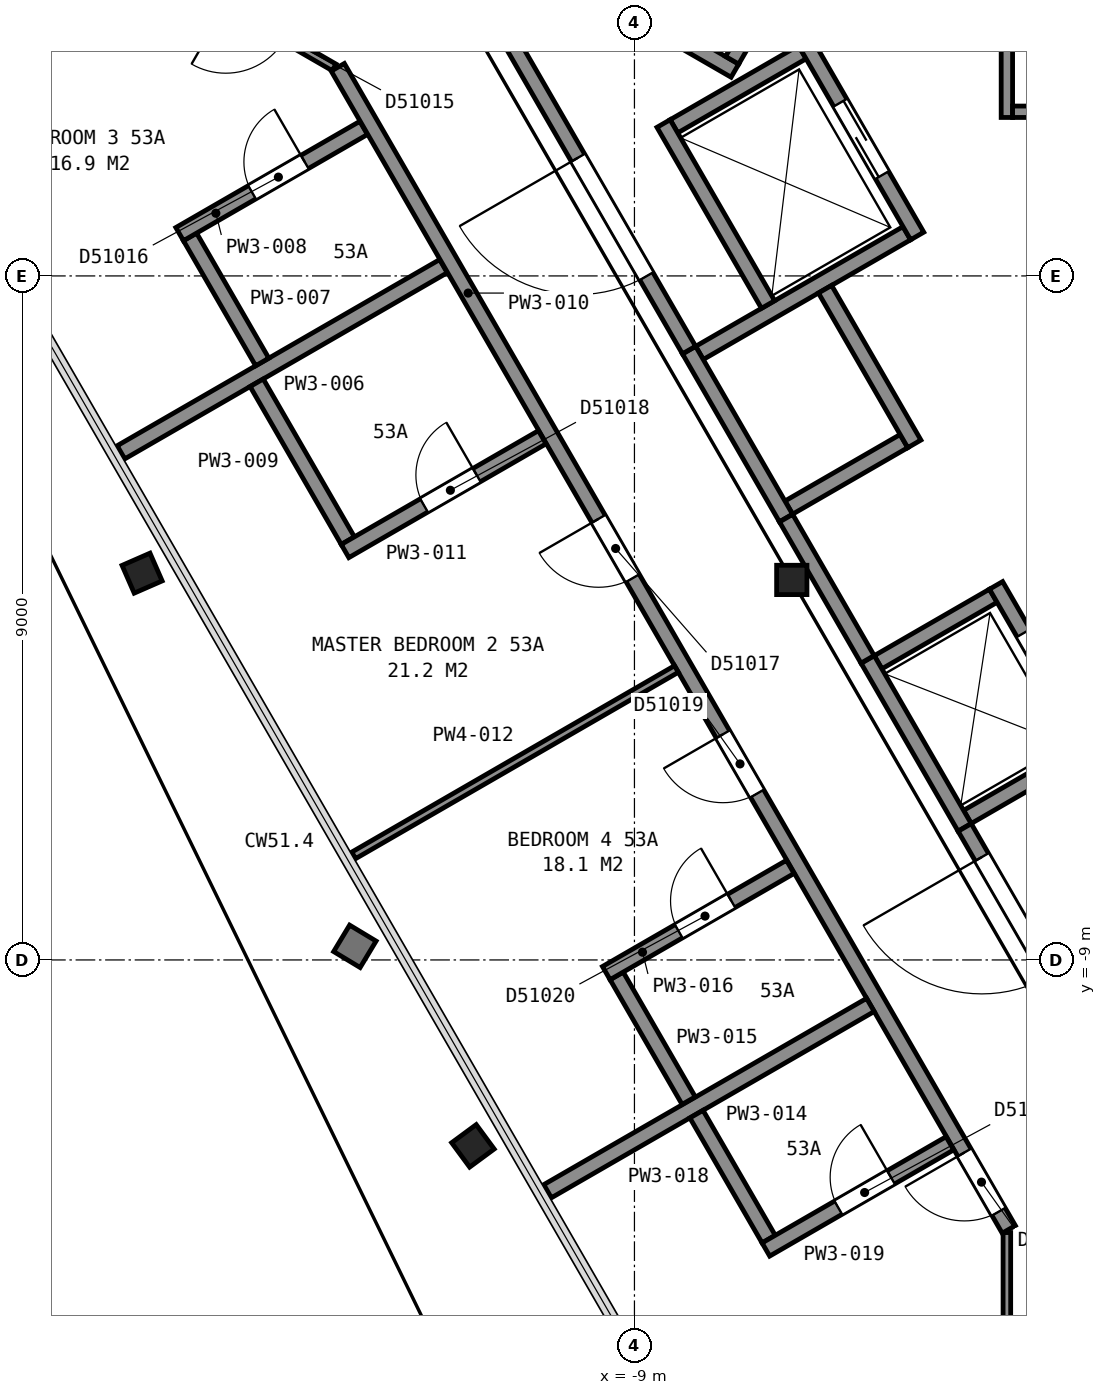
"""IFC4 building model, lengths in metres.
Left out: names, types, materials, properties, quantities, classifications, styles, units other than length and angle.
Written with IfcOpenShell. Run it as: python <this file> out.ifc"""

import sys

from ifc_helpers import new_model, si_unit, direction, frame, frame_2d, origin, origin_2d, place, context, subcontext, project, spatial, rectangle, i_section, extrude, element, fill, save


model = new_model("IFC4")
c1 = context("Model", 3, precision=1e-05, world=origin(), true_north=direction((0.0, 1.0)))
c2 = subcontext(c1, "Body", "Model", "MODEL_VIEW")
j1 = project(units=[si_unit("LENGTHUNIT", "METRE"), si_unit("PLANEANGLEUNIT", "RADIAN")], contexts=[c1])
p1 = place(None, origin())
s1 = spatial("IfcSite", under=j1, at=p1, CompositionType="ELEMENT")
p2 = place(p1, origin())
s2 = spatial("IfcBuilding", under=s1, at=p2, CompositionType="ELEMENT")
p3 = place(p2, frame((0.0, 0.0, 213.8)))
s3 = spatial("IfcBuildingStorey", under=s2, at=p3, CompositionType="ELEMENT", Elevation=213.8)
p4 = place(p3, frame((-15.276, -3.823, 0.035), z_axis=(-0.169909418079, -0.074413848602, 0.982646105566), x_axis=(-0.500226220169, 0.86564150205, -0.020940835345)))
e1 = element("IfcColumn", 1, at=p4, inside=s3, PredefinedType="COLUMN", context=c2, shape_type="SweptSolid", body=[
    extrude(i_section(OverallWidth=0.401, OverallDepth=0.399, WebThickness=0.025, FlangeThickness=0.04, FilletRadius=0.015, at=origin_2d()), origin(), (0.0, 0.0, 1.0), 3.694),
])
p5 = place(p3, frame((-10.945, -11.314, 0.035), z_axis=(-0.15133236457, -0.11150110493, 0.982174128672), x_axis=(-0.499861643135, 0.865843891747, 0.021276579787)))
e2 = element("IfcColumn", 2, at=p5, inside=s3, PredefinedType="COLUMN", context=c2, shape_type="SweptSolid", body=[
    extrude(i_section(OverallWidth=0.401, OverallDepth=0.399, WebThickness=0.025, FlangeThickness=0.04, FilletRadius=0.015, at=origin_2d()), origin(), (0.0, 0.0, 1.0), 3.696),
])
p6 = place(p3, frame((-6.93, -4.0, 0.0), z_axis=(0.0, 0.0, 1.0), x_axis=(1.0, 0.0, 0.0)))
e3 = element("IfcColumn", 3, at=p6, inside=s3, PredefinedType="COLUMN", context=c2, shape_type="SweptSolid", body=[
    extrude(i_section(OverallWidth=0.399, OverallDepth=0.386, WebThickness=0.021, FlangeThickness=0.033, FilletRadius=0.015, at=origin_2d()), origin(), (0.0, 0.0, 1.0), 3.7),
])
p7 = place(p3, frame((-7.678, 2.701, 0.0), z_axis=(0.0, 0.0, 1.0), x_axis=(-0.866019993635, 0.500009370536, 0.0)))
e4 = element("IfcWall", 4, at=p7, inside=s3, PredefinedType="PARTITIONING", context=c2, shape_type="SweptSolid", body=[
    extrude(rectangle(XDim=9.6, YDim=0.2, at=frame_2d((4.8, 0.0))), origin(), (0.0, 0.0, 1.0), 3.45),
])
p8 = place(p3, frame((-6.315, 5.262, 0.0), z_axis=(0.0, 0.0, 1.0), x_axis=(-0.500049511043, -0.865996816683, 0.0)))
e5 = element("IfcWall", 5, at=p8, inside=s3, PredefinedType="PARTITIONING", context=c2, shape_type="SweptSolid", body=[
    extrude(rectangle(XDim=2.8, YDim=0.2, at=frame_2d((1.4, 0.0))), origin(), (0.0, 0.0, 1.0), 3.45),
])
for number, where, z_axis, x_axis in (
    (6, (-4.62, -7.118, 0.0), (0.0, 0.0, 1.0), (0.866, 0.5, 0.0)),
    (7, (-5.795, -5.083, 0.0), (0.0, 0.0, 1.0), (0.866, 0.5, 0.0)),
    (8, (-6.97, -3.048, 0.0), (0.0, 0.0, 1.0), (0.866, 0.5, 0.0)),
):
    element("IfcWall", number, at=place(p3, frame(where, z_axis=z_axis, x_axis=x_axis)), inside=s3, PredefinedType="PARTITIONING", context=c2, shape_type="SweptSolid", body=[
        extrude(rectangle(XDim=1.75, YDim=0.2, at=frame_2d((0.875, 0.0))), origin(), (0.0, 0.0, 1.0), 3.7),
    ])
p9 = place(p3, frame((-8.145, -1.013, 0.0), z_axis=(0.0, 0.0, 1.0), x_axis=(0.866016494683, 0.500015430699, 0.0)))
e9 = element("IfcWall", 9, at=p9, inside=s3, PredefinedType="PARTITIONING", context=c2, shape_type="SweptSolid", body=[
    extrude(rectangle(XDim=3.15, YDim=0.2, at=frame_2d((1.575, 0.0))), origin(), (0.0, 0.0, 1.0), 3.7),
])
p10 = place(p3, frame((-8.48, 1.969, 0.0), z_axis=(0.0, 0.0, 1.0), x_axis=(0.866000020948, 0.500043961785, 0.0)))
e10 = element("IfcWall", 10, at=p10, inside=s3, PredefinedType="PARTITIONING", context=c2, shape_type="SweptSolid", body=[
    extrude(rectangle(XDim=1.95, YDim=0.2, at=frame_2d((0.975, 0.0))), origin(), (0.0, 0.0, 1.0), 3.7),
])
p11 = place(p3, frame((-5.28, 0.525, 0.0), z_axis=(0.0, 0.0, 1.0), x_axis=(-0.500037662692, 0.866003658127, 0.0)))
e11 = element("IfcWall", 11, at=p11, inside=s3, PredefinedType="PARTITIONING", context=c2, shape_type="SweptSolid", body=[
    extrude(rectangle(XDim=2.95, YDim=0.2, at=frame_2d((1.475, 0.0))), origin(), (0.0, 0.0, 1.0), 3.7),
])
p12 = place(p11, frame((0.925, 0.0, 0.0)))
e12 = element("IfcOpeningElement", 12, at=p12, cuts=e11, PredefinedType="OPENING", context=c2, shape_type="SweptSolid", body=[
    extrude(rectangle(XDim=1.1, YDim=2.1, at=frame_2d((0.55, 1.05))), frame((0.0, 0.11, 0.0), z_axis=(0.0, -1.0, 0.0), x_axis=(1.0, 0.0, 0.0)), (0.0, 0.0, 1.0), 0.22),
])
p13 = place(p3, frame((-2.968, -6.28, 0.0), z_axis=(0.0, 0.0, 1.0), x_axis=(-0.499990435942, 0.866030925526, 0.0)))
e13 = element("IfcWall", 13, at=p13, inside=s3, PredefinedType="PARTITIONING", context=c2, shape_type="SweptSolid", body=[
    extrude(rectangle(XDim=2.55, YDim=0.2, at=frame_2d((1.275, 0.0))), origin(), (0.0, 0.0, 1.0), 3.7),
])
p14 = place(p13, frame((0.725, 0.0, 0.0)))
e14 = element("IfcOpeningElement", 14, at=p14, cuts=e13, PredefinedType="OPENING", context=c2, shape_type="SweptSolid", body=[
    extrude(rectangle(XDim=1.1, YDim=2.1, at=frame_2d((0.55, 1.05))), frame((0.0, 0.11, 0.0), z_axis=(0.0, -1.0, 0.0), x_axis=(1.0, 0.0, 0.0)), (0.0, 0.0, 1.0), 0.22),
])
p15 = place(p3, frame((-5.318, -2.21, 0.0), z_axis=(0.0, 0.0, 1.0), x_axis=(-0.499938297808, 0.866061024631, 0.0)))
e15 = element("IfcWall", 15, at=p15, inside=s3, PredefinedType="PARTITIONING", context=c2, shape_type="SweptSolid", body=[
    extrude(rectangle(XDim=2.35, YDim=0.2, at=frame_2d((1.175, 0.0))), origin(), (0.0, 0.0, 1.0), 3.7),
])
p16 = place(p3, frame((-7.242, -0.376, 0.0), z_axis=(0.0, 0.0, 1.0), x_axis=(-0.499996545922, 0.866027397988, 0.0)))
e16 = element("IfcWall", 16, at=p16, inside=s3, PredefinedType="PARTITIONING", context=c2, shape_type="SweptSolid", body=[
    extrude(rectangle(XDim=2.75, YDim=0.2, at=frame_2d((1.375, 0.0))), origin(), (0.0, 0.0, 1.0), 3.7),
])
for number, where, z_axis, x_axis in (
    (17, (-4.656, -7.255, 0.0), (0.0, 0.0, 1.0), (-0.5, 0.866, 0.0)),
    (18, (-7.006, -3.185, 0.0), (0.0, 0.0, 1.0), (-0.5, 0.866, 0.0)),
):
    element("IfcWall", number, at=place(p3, frame(where, z_axis=z_axis, x_axis=x_axis)), inside=s3, PredefinedType="PARTITIONING", context=c2, shape_type="SweptSolid", body=[
        extrude(rectangle(XDim=2.55, YDim=0.2, at=frame_2d((1.275, 0.0))), origin(), (0.0, 0.0, 1.0), 3.7),
    ])
p17 = place(p3, frame((-11.591, 4.755, 0.0), z_axis=(0.0, 0.0, 1.0), x_axis=(0.500043977787, -0.866000011708, 0.0)))
e19 = element("IfcWall", 19, at=p17, inside=s3, PredefinedType="PARTITIONING", context=c2, shape_type="SweptSolid", body=[
    extrude(rectangle(XDim=6.617, YDim=0.2, at=frame_2d((3.308, 0.0))), origin(), (0.0, 0.0, 1.0), 3.45),
])
p18 = place(p17, frame((3.695, 0.0, 0.0)))
e20 = element("IfcOpeningElement", 20, at=p18, cuts=e19, PredefinedType="OPENING", context=c2, shape_type="SweptSolid", body=[
    extrude(rectangle(XDim=1.8, YDim=2.1, at=frame_2d((0.9, 1.05))), frame((0.0, 0.11, 0.0), z_axis=(0.0, -1.0, 0.0), x_axis=(1.0, 0.0, 0.0)), (0.0, 0.0, 1.0), 0.22),
])
p19 = place(p3, frame((-7.005, -3.187, 0.0), z_axis=(0.0, 0.0, 1.0), x_axis=(0.499689606989, -0.866204535123, 0.0)))
e21 = element("IfcWall", 21, at=p19, inside=s3, PredefinedType="PARTITIONING", context=c2, shape_type="SweptSolid", body=[
    extrude(rectangle(XDim=2.145, YDim=0.2, at=frame_2d((1.072, 0.0))), origin(), (0.0, 0.0, 1.0), 3.45),
])
p20 = place(p3, frame((-4.655, -7.257, 0.0), z_axis=(0.0, 0.0, 1.0), x_axis=(0.499966124405, -0.866044960985, 0.0)))
e22 = element("IfcWall", 22, at=p20, inside=s3, PredefinedType="PARTITIONING", context=c2, shape_type="SweptSolid", body=[
    extrude(rectangle(XDim=5.956, YDim=0.2, at=frame_2d((2.978, 0.0))), origin(), (0.0, 0.0, 1.0), 3.45),
])
p21 = place(p20, frame((0.45, 0.0, 0.0)))
e23 = element("IfcOpeningElement", 23, at=p21, cuts=e22, PredefinedType="OPENING", context=c2, shape_type="SweptSolid", body=[
    extrude(rectangle(XDim=1.8, YDim=2.1, at=frame_2d((0.9, 1.05))), frame((0.0, 0.11, 0.0), z_axis=(0.0, -1.0, 0.0), x_axis=(1.0, 0.0, 0.0)), (0.0, 0.0, 1.0), 0.22),
])
p22 = place(p3, frame((-4.1, 2.085, 0.0), z_axis=(0.0, 0.0, 1.0), x_axis=(0.0, 1.0, 0.0)))
e24 = element("IfcWall", 24, at=p22, inside=s3, PredefinedType="PARTITIONING", context=c2, shape_type="SweptSolid", body=[
    extrude(rectangle(XDim=3.523, YDim=0.15, at=frame_2d((1.761, 0.0))), origin(), (0.0, 0.0, 1.0), 3.45),
])
p23 = place(p3, frame((-4.025, 2.16, 0.0), z_axis=(0.0, 0.0, 1.0), x_axis=(1.0, 0.0, 0.0)))
e25 = element("IfcWall", 25, at=p23, inside=s3, PredefinedType="PARTITIONING", context=c2, shape_type="SweptSolid", body=[
    extrude(rectangle(XDim=1.238, YDim=0.15, at=frame_2d((0.619, 0.0))), origin(), (0.0, 0.0, 1.0), 3.45),
])
p24 = place(p3, frame((-12.952, 2.744, 0.0), z_axis=(0.0, 0.0, 1.0), x_axis=(-0.86608949446, 0.499888975259, 0.0)))
e26 = element("IfcWall", 26, at=p24, inside=s3, PredefinedType="PARTITIONING", context=c2, shape_type="SweptSolid", body=[
    extrude(rectangle(XDim=8.165, YDim=0.1, at=frame_2d((4.083, 0.0))), origin(), (0.0, 0.0, 1.0), 2.713),
])
p25 = place(p24, frame((4.65, 0.0, 0.0)))
e27 = element("IfcOpeningElement", 27, at=p25, cuts=e26, PredefinedType="OPENING", context=c2, shape_type="SweptSolid", body=[
    extrude(rectangle(XDim=0.9, YDim=2.1, at=frame_2d((0.45, 1.05))), frame((0.0, 0.06, 0.0), z_axis=(0.0, -1.0, 0.0), x_axis=(1.0, 0.0, 0.0)), (0.0, 0.0, 1.0), 0.12),
])
p26 = place(p24, frame((0.746, 0.0, 0.0)))
e28 = element("IfcOpeningElement", 28, at=p26, cuts=e26, PredefinedType="OPENING", context=c2, shape_type="SweptSolid", body=[
    extrude(rectangle(XDim=0.9, YDim=2.1, at=frame_2d((0.45, 1.05))), frame((0.0, 0.06, 0.0), z_axis=(0.0, -1.0, 0.0), x_axis=(1.0, 0.0, 0.0)), (0.0, 0.0, 1.0), 0.12),
])
p27 = place(p3, frame((-18.308, 2.099, 0.0), z_axis=(0.0, 0.0, 1.0), x_axis=(0.866054218355, 0.499950088379, 0.0)))
e29 = element("IfcWall", 29, at=p27, inside=s3, PredefinedType="PARTITIONING", context=c2, shape_type="SweptSolid", body=[
    extrude(rectangle(XDim=3.652, YDim=0.1, at=frame_2d((1.826, 0.0))), origin(), (0.0, 0.0, 1.0), 2.713),
])
p28 = place(p3, frame((-15.756, -2.321, 0.0), z_axis=(0.0, 0.0, 1.0), x_axis=(0.866042025588, 0.499971209087, 0.0)))
e30 = element("IfcWall", 30, at=p28, inside=s3, PredefinedType="PARTITIONING", context=c2, shape_type="SweptSolid", body=[
    extrude(rectangle(XDim=4.899, YDim=0.2, at=frame_2d((2.45, 0.0))), origin(), (0.0, 0.0, 1.0), 2.713),
])
p29 = place(p3, frame((-14.847, 0.513, 0.0), z_axis=(0.0, 0.0, 1.0), x_axis=(0.499911523785, -0.866076479525, 0.0)))
e31 = element("IfcWall", 31, at=p29, inside=s3, PredefinedType="PARTITIONING", context=c2, shape_type="SweptSolid", body=[
    extrude(rectangle(XDim=1.9, YDim=0.2, at=frame_2d((0.95, 0.0))), origin(), (0.0, 0.0, 1.0), 2.713),
])
p30 = place(p3, frame((-12.563, 1.948, 0.0), z_axis=(0.0, 0.0, 1.0), x_axis=(-0.866041588165, -0.499971966783, 0.0)))
e32 = element("IfcWall", 32, at=p30, inside=s3, PredefinedType="PARTITIONING", context=c2, shape_type="SweptSolid", body=[
    extrude(rectangle(XDim=2.795, YDim=0.2, at=frame_2d((1.397, 0.0))), origin(), (0.0, 0.0, 1.0), 2.713),
])
p31 = place(p30, frame((0.895, 0.0, 0.0)))
e33 = element("IfcOpeningElement", 33, at=p31, cuts=e32, PredefinedType="OPENING", context=c2, shape_type="SweptSolid", body=[
    extrude(rectangle(XDim=0.8, YDim=2.1, at=frame_2d((0.4, 1.05))), frame((0.0, 0.11, 0.0), z_axis=(0.0, -1.0, 0.0), x_axis=(1.0, 0.0, 0.0)), (0.0, 0.0, 1.0), 0.22),
])
p32 = place(p3, frame((-13.97, -1.406, 0.0), z_axis=(0.0, 0.0, 1.0), x_axis=(0.499784123135, -0.866150004481, 0.0)))
e34 = element("IfcWall", 34, at=p32, inside=s3, PredefinedType="PARTITIONING", context=c2, shape_type="SweptSolid", body=[
    extrude(rectangle(XDim=2.399, YDim=0.2, at=frame_2d((1.199, 0.0))), origin(), (0.0, 0.0, 1.0), 2.713),
])
p33 = place(p3, frame((-4.075, -12.545, 0.0), z_axis=(0.0, 0.0, 1.0), x_axis=(-0.499999743747, 0.866025551732, 0.0)))
e35 = element("IfcWall", 35, at=p33, inside=s3, PredefinedType="PARTITIONING", context=c2, shape_type="SweptSolid", body=[
    extrude(rectangle(XDim=17.656, YDim=0.2, at=frame_2d((8.828, 0.0))), origin(), (0.0, 0.0, 1.0), 2.713),
])
p34 = place(p33, frame((9.895, 0.0, 0.0)))
e36 = element("IfcOpeningElement", 36, at=p34, cuts=e35, PredefinedType="OPENING", context=c2, shape_type="SweptSolid", body=[
    extrude(rectangle(XDim=0.9, YDim=2.1, at=frame_2d((0.45, 1.05))), frame((0.0, 0.11, 0.0), z_axis=(0.0, -1.0, 0.0), x_axis=(1.0, 0.0, 0.0)), (0.0, 0.0, 1.0), 0.22),
])
p35 = place(p33, frame((6.622, 0.0, 0.0)))
e37 = element("IfcOpeningElement", 37, at=p35, cuts=e35, PredefinedType="OPENING", context=c2, shape_type="SweptSolid", body=[
    extrude(rectangle(XDim=0.9, YDim=2.1, at=frame_2d((0.45, 1.05))), frame((0.0, 0.11, 0.0), z_axis=(0.0, -1.0, 0.0), x_axis=(1.0, 0.0, 0.0)), (0.0, 0.0, 1.0), 0.22),
])
p36 = place(p33, frame((0.268, 0.0, 0.0)))
e38 = element("IfcOpeningElement", 38, at=p36, cuts=e35, PredefinedType="OPENING", context=c2, shape_type="SweptSolid", body=[
    extrude(rectangle(XDim=0.9, YDim=2.1, at=frame_2d((0.45, 1.05))), frame((0.0, 0.11, 0.0), z_axis=(0.0, -1.0, 0.0), x_axis=(1.0, 0.0, 0.0)), (0.0, 0.0, 1.0), 0.22),
])
p37 = place(p3, frame((-12.808, -3.62, 0.0), z_axis=(0.0, 0.0, 1.0), x_axis=(0.866134024916, 0.499811815469, 0.0)))
e39 = element("IfcWall", 39, at=p37, inside=s3, PredefinedType="PARTITIONING", context=c2, shape_type="SweptSolid", body=[
    extrude(rectangle(XDim=2.996, YDim=0.2, at=frame_2d((1.498, 0.0))), origin(), (0.0, 0.0, 1.0), 2.713),
])
p38 = place(p37, frame((1.2, 0.0, 0.0)))
e40 = element("IfcOpeningElement", 40, at=p38, cuts=e39, PredefinedType="OPENING", context=c2, shape_type="SweptSolid", body=[
    extrude(rectangle(XDim=0.8, YDim=2.1, at=frame_2d((0.4, 1.05))), frame((0.0, 0.11, 0.0), z_axis=(0.0, -1.0, 0.0), x_axis=(1.0, 0.0, 0.0)), (0.0, 0.0, 1.0), 0.22),
])
p39 = place(p3, frame((-12.694, -7.624, 0.0), z_axis=(0.0, 0.0, 1.0), x_axis=(0.865991567799, 0.500058601068, 0.0)))
e41 = element("IfcWall", 41, at=p39, inside=s3, PredefinedType="PARTITIONING", context=c2, shape_type="SweptSolid", body=[
    extrude(rectangle(XDim=4.904, YDim=0.1, at=frame_2d((2.452, 0.0))), origin(), (0.0, 0.0, 1.0), 2.713),
])
p40 = place(p3, frame((-10.143, -12.043, 0.0), z_axis=(0.0, 0.0, 1.0), x_axis=(0.866136679459, 0.49980721533, 0.0)))
e42 = element("IfcWall", 42, at=p40, inside=s3, PredefinedType="PARTITIONING", context=c2, shape_type="SweptSolid", body=[
    extrude(rectangle(XDim=4.904, YDim=0.2, at=frame_2d((2.452, 0.0))), origin(), (0.0, 0.0, 1.0), 2.713),
])
p41 = place(p3, frame((-9.234, -9.21, 0.0), z_axis=(0.0, 0.0, 1.0), x_axis=(0.499949193323, -0.866054735046, 0.0)))
e43 = element("IfcWall", 43, at=p41, inside=s3, PredefinedType="PARTITIONING", context=c2, shape_type="SweptSolid", body=[
    extrude(rectangle(XDim=1.895, YDim=0.2, at=frame_2d((0.948, 0.0))), origin(), (0.0, 0.0, 1.0), 2.713),
])
p42 = place(p3, frame((-6.95, -7.775, 0.0), z_axis=(0.0, 0.0, 1.0), x_axis=(-0.866003766563, -0.500037474894, 0.0)))
e44 = element("IfcWall", 44, at=p42, inside=s3, PredefinedType="PARTITIONING", context=c2, shape_type="SweptSolid", body=[
    extrude(rectangle(XDim=2.795, YDim=0.2, at=frame_2d((1.397, 0.0))), origin(), (0.0, 0.0, 1.0), 2.713),
])
p43 = place(p42, frame((0.895, 0.0, 0.0)))
e45 = element("IfcOpeningElement", 45, at=p43, cuts=e44, PredefinedType="OPENING", context=c2, shape_type="SweptSolid", body=[
    extrude(rectangle(XDim=0.8, YDim=2.1, at=frame_2d((0.4, 1.05))), frame((0.0, 0.11, 0.0), z_axis=(0.0, -1.0, 0.0), x_axis=(1.0, 0.0, 0.0)), (0.0, 0.0, 1.0), 0.22),
])
p44 = place(p3, frame((-8.184, -11.029, 0.0), z_axis=(0.0, 0.0, 1.0), x_axis=(0.500134112126, -0.865947960265, 0.0)))
e46 = element("IfcWall", 46, at=p44, inside=s3, PredefinedType="PARTITIONING", context=c2, shape_type="SweptSolid", body=[
    extrude(rectangle(XDim=1.899, YDim=0.2, at=frame_2d((0.95, 0.0))), origin(), (0.0, 0.0, 1.0), 2.713),
])
p45 = place(p3, frame((-7.271, -12.81, 0.0), z_axis=(0.0, 0.0, 1.0), x_axis=(0.866041588165, 0.499971966783, 0.0)))
e47 = element("IfcWall", 47, at=p45, inside=s3, PredefinedType="PARTITIONING", context=c2, shape_type="SweptSolid", body=[
    extrude(rectangle(XDim=2.795, YDim=0.2, at=frame_2d((1.397, 0.0))), origin(), (0.0, 0.0, 1.0), 2.713),
])
p46 = place(p45, frame((1.1, 0.0, 0.0)))
e48 = element("IfcOpeningElement", 48, at=p46, cuts=e47, PredefinedType="OPENING", context=c2, shape_type="SweptSolid", body=[
    extrude(rectangle(XDim=0.8, YDim=2.1, at=frame_2d((0.4, 1.05))), frame((0.0, 0.11, 0.0), z_axis=(0.0, -1.0, 0.0), x_axis=(1.0, 0.0, 0.0)), (0.0, 0.0, 1.0), 0.22),
])
p47 = place(p3, frame((-4.1, -20.65, 0.0), z_axis=(0.0, 0.0, 1.0), x_axis=(0.0, 1.0, 0.0)))
e49 = element("IfcWall", 49, at=p47, inside=s3, PredefinedType="PARTITIONING", context=c2, shape_type="SweptSolid", body=[
    extrude(rectangle(XDim=8.063, YDim=0.1, at=frame_2d((4.031, 0.0))), origin(), (0.0, 0.0, 1.0), 2.713),
])
p48 = place(p14, origin())
e50 = element("IfcDoor", 50, at=p48, inside=s3, OperationType="SLIDING_TO_RIGHT", PredefinedType="DOOR", context=c2, shape_type="SweptSolid", body=[
    extrude(rectangle(XDim=1.1, YDim=2.1, at=frame_2d((0.55, 1.05))), frame((0.0, 0.025, 0.0), z_axis=(0.0, -1.0, 0.0), x_axis=(1.0, 0.0, 0.0)), (0.0, 0.0, 1.0), 0.05),
])
fill(e14, e50)
p49 = place(p12, origin())
e51 = element("IfcDoor", 51, at=p49, inside=s3, OperationType="SLIDING_TO_LEFT", PredefinedType="DOOR", context=c2, shape_type="SweptSolid", body=[
    extrude(rectangle(XDim=1.1, YDim=2.1, at=frame_2d((0.55, 1.05))), frame((0.0, 0.025, 0.0), z_axis=(0.0, -1.0, 0.0), x_axis=(1.0, 0.0, 0.0)), (0.0, 0.0, 1.0), 0.05),
])
fill(e12, e51)
p50 = place(p18, origin())
e52 = element("IfcDoor", 52, at=p50, inside=s3, OperationType="DOUBLE_DOOR_SINGLE_SWING", PredefinedType="DOOR", context=c2, shape_type="SweptSolid", body=[
    extrude(rectangle(XDim=1.8, YDim=2.1, at=frame_2d((0.9, 1.05))), frame((0.0, 0.025, 0.0), z_axis=(0.0, -1.0, 0.0), x_axis=(1.0, 0.0, 0.0)), (0.0, 0.0, 1.0), 0.05),
])
fill(e20, e52)
p51 = place(p21, origin())
e53 = element("IfcDoor", 53, at=p51, inside=s3, OperationType="DOUBLE_DOOR_SINGLE_SWING", PredefinedType="DOOR", context=c2, shape_type="SweptSolid", body=[
    extrude(rectangle(XDim=1.8, YDim=2.1, at=frame_2d((0.9, 1.05))), frame((0.0, 0.025, 0.0), z_axis=(0.0, -1.0, 0.0), x_axis=(1.0, 0.0, 0.0)), (0.0, 0.0, 1.0), 0.05),
])
fill(e23, e53)
p52 = place(p31, origin())
e54 = element("IfcDoor", 54, at=p52, inside=s3, OperationType="SINGLE_SWING_LEFT", PredefinedType="DOOR", context=c2, shape_type="SweptSolid", body=[
    extrude(rectangle(XDim=0.8, YDim=2.1, at=frame_2d((0.4, 1.05))), frame((0.0, 0.025, 0.0), z_axis=(0.0, -1.0, 0.0), x_axis=(1.0, 0.0, 0.0)), (0.0, 0.0, 1.0), 0.05),
])
fill(e33, e54)
p53 = place(p34, origin())
e55 = element("IfcDoor", 55, at=p53, inside=s3, OperationType="SINGLE_SWING_RIGHT", PredefinedType="DOOR", context=c2, shape_type="SweptSolid", body=[
    extrude(rectangle(XDim=0.9, YDim=2.1, at=frame_2d((0.45, 1.05))), frame((0.0, 0.025, 0.0), z_axis=(0.0, -1.0, 0.0), x_axis=(1.0, 0.0, 0.0)), (0.0, 0.0, 1.0), 0.05),
])
fill(e36, e55)
p54 = place(p35, origin())
e56 = element("IfcDoor", 56, at=p54, inside=s3, OperationType="SINGLE_SWING_RIGHT", PredefinedType="DOOR", context=c2, shape_type="SweptSolid", body=[
    extrude(rectangle(XDim=0.9, YDim=2.1, at=frame_2d((0.45, 1.05))), frame((0.0, 0.025, 0.0), z_axis=(0.0, -1.0, 0.0), x_axis=(1.0, 0.0, 0.0)), (0.0, 0.0, 1.0), 0.05),
])
fill(e37, e56)
p55 = place(p36, origin())
e57 = element("IfcDoor", 57, at=p55, inside=s3, OperationType="SINGLE_SWING_RIGHT", PredefinedType="DOOR", context=c2, shape_type="SweptSolid", body=[
    extrude(rectangle(XDim=0.9, YDim=2.1, at=frame_2d((0.45, 1.05))), frame((0.0, 0.025, 0.0), z_axis=(0.0, -1.0, 0.0), x_axis=(1.0, 0.0, 0.0)), (0.0, 0.0, 1.0), 0.05),
])
fill(e38, e57)
p56 = place(p38, origin())
e58 = element("IfcDoor", 58, at=p56, inside=s3, OperationType="SINGLE_SWING_RIGHT", PredefinedType="DOOR", context=c2, shape_type="SweptSolid", body=[
    extrude(rectangle(XDim=0.8, YDim=2.1, at=frame_2d((0.4, 1.05))), frame((0.0, 0.025, 0.0), z_axis=(0.0, -1.0, 0.0), x_axis=(1.0, 0.0, 0.0)), (0.0, 0.0, 1.0), 0.05),
])
fill(e40, e58)
p57 = place(p43, origin())
e59 = element("IfcDoor", 59, at=p57, inside=s3, OperationType="SINGLE_SWING_LEFT", PredefinedType="DOOR", context=c2, shape_type="SweptSolid", body=[
    extrude(rectangle(XDim=0.8, YDim=2.1, at=frame_2d((0.4, 1.05))), frame((0.0, 0.025, 0.0), z_axis=(0.0, -1.0, 0.0), x_axis=(1.0, 0.0, 0.0)), (0.0, 0.0, 1.0), 0.05),
])
fill(e45, e59)
p58 = place(p46, origin())
e60 = element("IfcDoor", 60, at=p58, inside=s3, OperationType="SINGLE_SWING_RIGHT", PredefinedType="DOOR", context=c2, shape_type="SweptSolid", body=[
    extrude(rectangle(XDim=0.8, YDim=2.1, at=frame_2d((0.4, 1.05))), frame((0.0, 0.025, 0.0), z_axis=(0.0, -1.0, 0.0), x_axis=(1.0, 0.0, 0.0)), (0.0, 0.0, 1.0), 0.05),
])
fill(e48, e60)
save(model, sys.argv[1])
